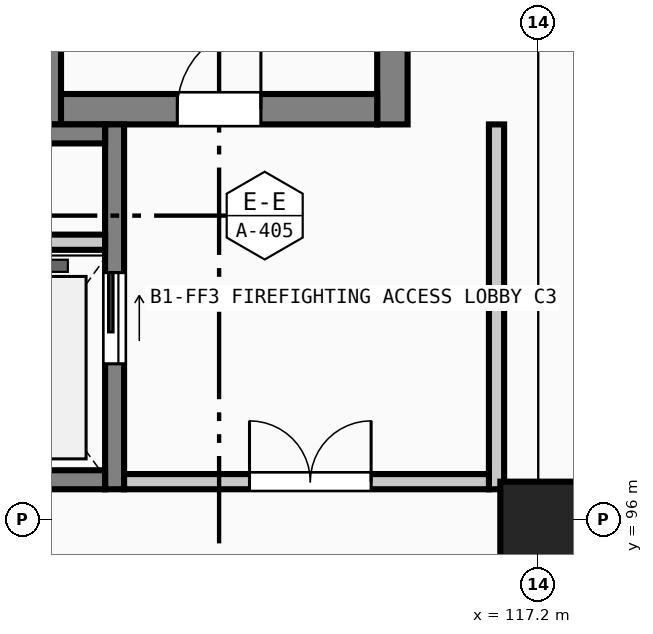
"""IFC4 building model, lengths in metres.
Left out: names, types, materials, properties, quantities, classifications, styles, units other than length and angle.
Written with IfcOpenShell. Run it as: python <this file> out.ifc"""

import sys

from ifc_helpers import new_model, si_unit, direction, frame, frame_2d, origin, origin_2d, place, context, subcontext, project, spatial, rectangle, extrude, element, fill, save


model = new_model("IFC4")
c1 = context("Model", 3, precision=1e-05, world=origin(), true_north=direction((0.0, 1.0)))
c2 = subcontext(c1, "Body", "Model", "MODEL_VIEW")
j1 = project(units=[si_unit("LENGTHUNIT", "METRE"), si_unit("PLANEANGLEUNIT", "RADIAN")], contexts=[c1])
p1 = place(None, origin())
s1 = spatial("IfcSite", under=j1, at=p1, CompositionType="ELEMENT")
p2 = place(p1, origin())
s2 = spatial("IfcBuilding", under=s1, at=p2, CompositionType="ELEMENT")
p3 = place(p2, frame((0.0, 0.0, -4.8)))
s3 = spatial("IfcBuildingStorey", under=s2, at=p3, CompositionType="ELEMENT", Elevation=-4.8)
p4 = place(p3, frame((117.2, 96.0, 0.0), z_axis=(0.0, 0.0, 1.0), x_axis=(1.0, 0.0, 0.0)))
e1 = element("IfcColumn", 1, at=p4, inside=s3, PredefinedType="COLUMN", context=c2, shape_type="SweptSolid", body=[
    extrude(rectangle(XDim=1.0, YDim=1.0, at=origin_2d()), origin(), (0.0, 0.0, 1.0), 4.8),
])
for number, where, z_axis, x_axis in (
    (2, (110.72, 101.2, 0.0), (0.0, 0.0, 1.0), (0.0, 1.0, 0.0)),
    (3, (115.28, 110.4, 0.0), (0.0, 0.0, 1.0), (0.0, -1.0, 0.0)),
):
    element("IfcWall", number, at=place(p3, frame(where, z_axis=z_axis, x_axis=x_axis)), inside=s3, PredefinedType="SHEAR", context=c2, shape_type="SweptSolid", body=[
        extrude(rectangle(XDim=9.2, YDim=0.4, at=frame_2d((4.6, 0.0))), origin(), (0.0, 0.0, 1.0), 4.5),
    ])
p5 = place(p3, frame((115.08, 101.4, 0.0), z_axis=(0.0, 0.0, 1.0), x_axis=(-1.0, 0.0, 0.0)))
e4 = element("IfcWall", 4, at=p5, inside=s3, PredefinedType="SHEAR", context=c2, shape_type="SweptSolid", body=[
    extrude(rectangle(XDim=4.16, YDim=0.4, at=frame_2d((2.08, 0.0))), origin(), (0.0, 0.0, 1.0), 4.5),
])
p6 = place(p5, frame((1.53, 0.0, 0.0)))
e5 = element("IfcOpeningElement", 5, at=p6, cuts=e4, PredefinedType="OPENING", context=c2, shape_type="SweptSolid", body=[
    extrude(rectangle(XDim=1.1, YDim=2.2, at=frame_2d((0.55, 1.1))), frame((0.0, 0.21, 0.0), z_axis=(0.0, -1.0, 0.0), x_axis=(1.0, 0.0, 0.0)), (0.0, 0.0, 1.0), 0.42),
])
p7 = place(p3, frame((111.625, 101.2, 0.0), z_axis=(0.0, 0.0, 1.0), x_axis=(0.0, -1.0, 0.0)))
e6 = element("IfcWall", 6, at=p7, inside=s3, PredefinedType="SOLIDWALL", context=c2, shape_type="SweptSolid", body=[
    extrude(rectangle(XDim=4.8, YDim=0.25, at=frame_2d((2.4, 0.0))), origin(), (0.0, 0.0, 1.0), 4.5),
])
p8 = place(p7, frame((1.95, 0.0, 0.0)))
e7 = element("IfcOpeningElement", 7, at=p8, cuts=e6, PredefinedType="OPENING", context=c2, shape_type="SweptSolid", body=[
    extrude(rectangle(XDim=1.2, YDim=2.2, at=frame_2d((0.6, 1.1))), frame((0.0, 0.135, 0.0), z_axis=(0.0, -1.0, 0.0), x_axis=(1.0, 0.0, 0.0)), (0.0, 0.0, 1.0), 0.27),
])
for number, where, z_axis, x_axis in (
    (8, (111.5, 96.525, 0.0), (0.0, 0.0, 1.0), (-1.0, 0.0, 0.0)),
    (9, (109.4, 101.075, 0.0), (0.0, 0.0, 1.0), (1.0, 0.0, 0.0)),
):
    element("IfcWall", number, at=place(p3, frame(where, z_axis=z_axis, x_axis=x_axis)), inside=s3, PredefinedType="SOLIDWALL", context=c2, shape_type="SweptSolid", body=[
        extrude(rectangle(XDim=2.1, YDim=0.25, at=frame_2d((1.05, 0.0))), origin(), (0.0, 0.0, 1.0), 4.5),
    ])
p9 = place(p3, frame((109.4, 99.65, 0.0), z_axis=(0.0, 0.0, 1.0), x_axis=(1.0, 0.0, 0.0)))
e10 = element("IfcWall", 10, at=p9, inside=s3, PredefinedType="SOLIDWALL", context=c2, shape_type="SweptSolid", body=[
    extrude(rectangle(XDim=2.1, YDim=0.2, at=frame_2d((1.05, 0.0))), origin(), (0.0, 0.0, 1.0), 4.5),
])
p10 = place(p3, frame((116.65, 101.2, 0.0), z_axis=(0.0, 0.0, 1.0), x_axis=(0.0, -1.0, 0.0)))
e11 = element("IfcWall", 11, at=p10, inside=s3, PredefinedType="SOLIDWALL", context=c2, shape_type="SweptSolid", body=[
    extrude(rectangle(XDim=4.8, YDim=0.2, at=frame_2d((2.4, 0.0))), origin(), (0.0, 0.0, 1.0), 4.5),
])
p11 = place(p3, frame((116.55, 96.5, 0.0), z_axis=(0.0, 0.0, 1.0), x_axis=(-1.0, 0.0, 0.0)))
e12 = element("IfcWall", 12, at=p11, inside=s3, PredefinedType="SOLIDWALL", context=c2, shape_type="SweptSolid", body=[
    extrude(rectangle(XDim=4.8, YDim=0.2, at=frame_2d((2.4, 0.0))), origin(), (0.0, 0.0, 1.0), 4.5),
])
p12 = place(p11, frame((1.55, 0.0, 0.0)))
e13 = element("IfcOpeningElement", 13, at=p12, cuts=e12, PredefinedType="OPENING", context=c2, shape_type="SweptSolid", body=[
    extrude(rectangle(XDim=1.6, YDim=2.2, at=frame_2d((0.8, 1.1))), frame((0.0, 0.11, 0.0), z_axis=(0.0, -1.0, 0.0), x_axis=(1.0, 0.0, 0.0)), (0.0, 0.0, 1.0), 0.22),
])
p13 = place(p6, frame((1.1, 0.0, 0.0), z_axis=(0.0, 0.0, 1.0), x_axis=(-1.0, 0.0, 0.0)))
e14 = element("IfcDoor", 14, at=p13, inside=s3, OperationType="SINGLE_SWING_RIGHT", PredefinedType="DOOR", context=c2, shape_type="SweptSolid", body=[
    extrude(rectangle(XDim=1.1, YDim=2.2, at=frame_2d((0.55, 1.1))), frame((0.0, 0.025, 0.0), z_axis=(0.0, -1.0, 0.0), x_axis=(1.0, 0.0, 0.0)), (0.0, 0.0, 1.0), 0.05),
])
fill(e5, e14)
p14 = place(p8, origin())
e15 = element("IfcDoor", 15, at=p14, inside=s3, OperationType="SLIDING_TO_LEFT", PredefinedType="DOOR", context=c2, shape_type="SweptSolid", body=[
    extrude(rectangle(XDim=1.2, YDim=2.2, at=frame_2d((0.6, 1.1))), frame((0.0, 0.025, 0.0), z_axis=(0.0, -1.0, 0.0), x_axis=(1.0, 0.0, 0.0)), (0.0, 0.0, 1.0), 0.05),
])
fill(e7, e15)
p15 = place(p12, frame((1.6, 0.0, 0.0), z_axis=(0.0, 0.0, 1.0), x_axis=(-1.0, 0.0, 0.0)))
e16 = element("IfcDoor", 16, at=p15, inside=s3, OperationType="DOUBLE_DOOR_SINGLE_SWING", PredefinedType="DOOR", context=c2, shape_type="SweptSolid", body=[
    extrude(rectangle(XDim=1.6, YDim=2.2, at=frame_2d((0.8, 1.1))), frame((0.0, 0.025, 0.0), z_axis=(0.0, -1.0, 0.0), x_axis=(1.0, 0.0, 0.0)), (0.0, 0.0, 1.0), 0.05),
])
fill(e13, e16)
save(model, sys.argv[1])
